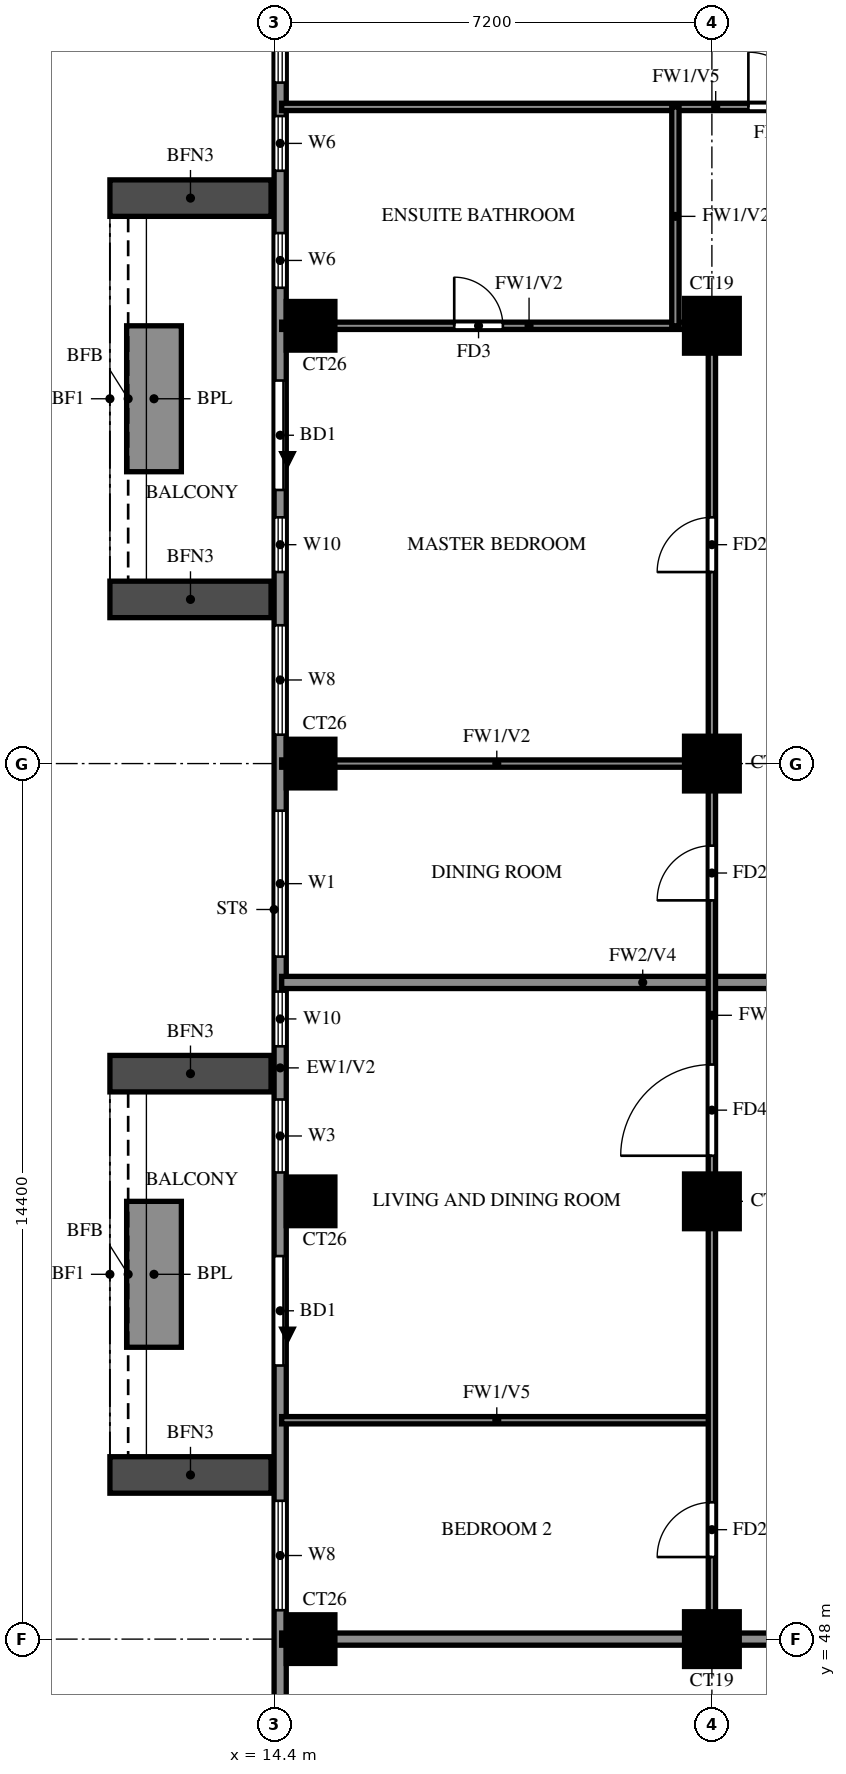
"""IFC4 building model, lengths in metres.
Left out: names, types, materials, properties, quantities, classifications, styles, units other than length and angle.
Written with IfcOpenShell. Run it as: python <this file> out.ifc"""

import sys

from ifc_helpers import new_model, si_unit, direction, frame, frame_2d, origin, origin_2d, place, context, subcontext, project, spatial, rectangle, extrude, source, transform, mapped, element, fill, save


model = new_model("IFC4")
c1 = context("Model", 3, precision=1e-05, world=origin(), true_north=direction((0.0, 1.0)))
c2 = subcontext(c1, "Body", "Model", "MODEL_VIEW")
j1 = project(units=[si_unit("LENGTHUNIT", "METRE"), si_unit("PLANEANGLEUNIT", "RADIAN")], contexts=[c1])
p1 = place(None, origin())
s1 = spatial("IfcSite", under=j1, at=p1, CompositionType="ELEMENT")
p2 = place(p1, origin())
s2 = spatial("IfcBuilding", under=s1, at=p2, CompositionType="ELEMENT")
p3 = place(p2, frame((0.0, 0.0, 178.0)))
s3 = spatial("IfcBuildingStorey", under=s2, at=p3, CompositionType="ELEMENT", Elevation=178.0)
m1 = source(origin(), c2, "Body", "SweptSolid", [
    extrude(rectangle(XDim=0.8, YDim=0.8, at=origin_2d()), origin(), (0.0, 0.0, 1.0), 3.2),
])
p4 = place(p3, frame((15.0, 48.0, 0.0), z_axis=(0.0, 0.0, 1.0), x_axis=(1.0, 0.0, 0.0)))
e1 = element("IfcColumn", 1, at=p4, inside=s3, PredefinedType="COLUMN", context=c2, shape_type="MappedRepresentation", body=[
    mapped(m1, transform((0.0, 0.0, 0.0))),
])
m2 = source(origin(), c2, "Body", "SweptSolid", [
    extrude(rectangle(XDim=0.9, YDim=0.9, at=origin_2d()), origin(), (0.0, 0.0, 1.0), 3.2),
])
p5 = place(p3, frame((21.6, 48.0, 0.0), z_axis=(0.0, 0.0, 1.0), x_axis=(1.0, 0.0, 0.0)))
e2 = element("IfcColumn", 2, at=p5, inside=s3, PredefinedType="COLUMN", context=c2, shape_type="MappedRepresentation", body=[
    mapped(m2, transform((0.0, 0.0, 0.0))),
])
p6 = place(p3, frame((15.0, 55.2, 0.0), z_axis=(0.0, 0.0, 1.0), x_axis=(1.0, 0.0, 0.0)))
e3 = element("IfcColumn", 3, at=p6, inside=s3, PredefinedType="COLUMN", context=c2, shape_type="MappedRepresentation", body=[
    mapped(m1, transform((0.0, 0.0, 0.0))),
])
p7 = place(p3, frame((21.6, 55.2, 0.0), z_axis=(0.0, 0.0, 1.0), x_axis=(1.0, 0.0, 0.0)))
e4 = element("IfcColumn", 4, at=p7, inside=s3, PredefinedType="COLUMN", context=c2, shape_type="MappedRepresentation", body=[
    mapped(m2, transform((0.0, 0.0, 0.0))),
])
p8 = place(p3, frame((15.0, 62.4, 0.0), z_axis=(0.0, 0.0, 1.0), x_axis=(1.0, 0.0, 0.0)))
e5 = element("IfcColumn", 5, at=p8, inside=s3, PredefinedType="COLUMN", context=c2, shape_type="MappedRepresentation", body=[
    mapped(m1, transform((0.0, 0.0, 0.0))),
])
p9 = place(p3, frame((21.6, 62.4, 0.0), z_axis=(0.0, 0.0, 1.0), x_axis=(1.0, 0.0, 0.0)))
e6 = element("IfcColumn", 6, at=p9, inside=s3, PredefinedType="COLUMN", context=c2, shape_type="MappedRepresentation", body=[
    mapped(m2, transform((0.0, 0.0, 0.0))),
])
p10 = place(p3, frame((15.0, 69.6, 0.0), z_axis=(0.0, 0.0, 1.0), x_axis=(1.0, 0.0, 0.0)))
e7 = element("IfcColumn", 7, at=p10, inside=s3, PredefinedType="COLUMN", context=c2, shape_type="MappedRepresentation", body=[
    mapped(m1, transform((0.0, 0.0, 0.0))),
])
p11 = place(p3, frame((21.6, 69.6, 0.0), z_axis=(0.0, 0.0, 1.0), x_axis=(1.0, 0.0, 0.0)))
e8 = element("IfcColumn", 8, at=p11, inside=s3, PredefinedType="COLUMN", context=c2, shape_type="MappedRepresentation", body=[
    mapped(m2, transform((0.0, 0.0, 0.0))),
])
p12 = place(p3, frame((14.5, 76.6, 0.0), z_axis=(0.0, 0.0, 1.0), x_axis=(0.0, -1.0, 0.0)))
e9 = element("IfcWall", 9, at=p12, inside=s3, PredefinedType="SOLIDWALL", context=c2, shape_type="SweptSolid", body=[
    extrude(rectangle(XDim=33.4, YDim=0.2, at=frame_2d((16.7, 0.0))), origin(), (0.0, 0.0, 1.0), 3.2),
])
p13 = place(p12, frame((7.9, 0.0, 0.0)))
e10 = element("IfcOpeningElement", 10, at=p13, cuts=e9, PredefinedType="OPENING", context=c2, shape_type="SweptSolid", body=[
    extrude(rectangle(XDim=1.8, YDim=2.4, at=frame_2d((0.9, 1.2))), frame((0.0, 0.11, 0.0), z_axis=(0.0, -1.0, 0.0), x_axis=(1.0, 0.0, 0.0)), (0.0, 0.0, 1.0), 0.22),
])
p14 = place(p12, frame((22.3, 0.0, 0.0)))
e11 = element("IfcOpeningElement", 11, at=p14, cuts=e9, PredefinedType="OPENING", context=c2, shape_type="SweptSolid", body=[
    extrude(rectangle(XDim=1.8, YDim=2.4, at=frame_2d((0.9, 1.2))), frame((0.0, 0.11, 0.0), z_axis=(0.0, -1.0, 0.0), x_axis=(1.0, 0.0, 0.0)), (0.0, 0.0, 1.0), 0.22),
])
p15 = place(p12, frame((29.875, 0.0, 0.6)))
e12 = element("IfcOpeningElement", 12, at=p15, cuts=e9, PredefinedType="OPENING", context=c2, shape_type="SweptSolid", body=[
    extrude(rectangle(XDim=2.4, YDim=2.4, at=frame_2d((1.2, 1.2))), frame((0.0, 0.11, 0.0), z_axis=(0.0, -1.0, 0.0), x_axis=(1.0, 0.0, 0.0)), (0.0, 0.0, 1.0), 0.22),
])
p16 = place(p12, frame((26.325, 0.0, 0.6)))
e13 = element("IfcOpeningElement", 13, at=p16, cuts=e9, PredefinedType="OPENING", context=c2, shape_type="SweptSolid", body=[
    extrude(rectangle(XDim=1.8, YDim=2.4, at=frame_2d((0.9, 1.2))), frame((0.0, 0.11, 0.0), z_axis=(0.0, -1.0, 0.0), x_axis=(1.0, 0.0, 0.0)), (0.0, 0.0, 1.0), 0.22),
])
p17 = place(p12, frame((17.95, 0.0, 0.6)))
e14 = element("IfcOpeningElement", 14, at=p17, cuts=e9, PredefinedType="OPENING", context=c2, shape_type="SweptSolid", body=[
    extrude(rectangle(XDim=0.9, YDim=2.4, at=frame_2d((0.45, 1.2))), frame((0.0, 0.11, 0.0), z_axis=(0.0, -1.0, 0.0), x_axis=(1.0, 0.0, 0.0)), (0.0, 0.0, 1.0), 0.22),
])
p18 = place(p12, frame((19.725, 0.0, 0.6)))
e15 = element("IfcOpeningElement", 15, at=p18, cuts=e9, PredefinedType="OPENING", context=c2, shape_type="SweptSolid", body=[
    extrude(rectangle(XDim=1.2, YDim=2.4, at=frame_2d((0.6, 1.2))), frame((0.0, 0.11, 0.0), z_axis=(0.0, -1.0, 0.0), x_axis=(1.0, 0.0, 0.0)), (0.0, 0.0, 1.0), 0.22),
])
p19 = place(p12, frame((14.975, 0.0, 0.6)))
e16 = element("IfcOpeningElement", 16, at=p19, cuts=e9, PredefinedType="OPENING", context=c2, shape_type="SweptSolid", body=[
    extrude(rectangle(XDim=2.4, YDim=2.4, at=frame_2d((1.2, 1.2))), frame((0.0, 0.11, 0.0), z_axis=(0.0, -1.0, 0.0), x_axis=(1.0, 0.0, 0.0)), (0.0, 0.0, 1.0), 0.22),
])
p20 = place(p12, frame((10.15, 0.0, 0.6)))
e17 = element("IfcOpeningElement", 17, at=p20, cuts=e9, PredefinedType="OPENING", context=c2, shape_type="SweptSolid", body=[
    extrude(rectangle(XDim=0.9, YDim=2.4, at=frame_2d((0.45, 1.2))), frame((0.0, 0.11, 0.0), z_axis=(0.0, -1.0, 0.0), x_axis=(1.0, 0.0, 0.0)), (0.0, 0.0, 1.0), 0.22),
])
p21 = place(p12, frame((11.925, 0.0, 0.6)))
e18 = element("IfcOpeningElement", 18, at=p21, cuts=e9, PredefinedType="OPENING", context=c2, shape_type="SweptSolid", body=[
    extrude(rectangle(XDim=1.8, YDim=2.4, at=frame_2d((0.9, 1.2))), frame((0.0, 0.11, 0.0), z_axis=(0.0, -1.0, 0.0), x_axis=(1.0, 0.0, 0.0)), (0.0, 0.0, 1.0), 0.22),
])
p22 = place(p12, frame((3.55, 0.0, 1.5)))
e19 = element("IfcOpeningElement", 19, at=p22, cuts=e9, PredefinedType="OPENING", context=c2, shape_type="SweptSolid", body=[
    extrude(rectangle(XDim=0.9, YDim=0.9, at=frame_2d((0.45, 0.45))), frame((0.0, 0.11, 0.0), z_axis=(0.0, -1.0, 0.0), x_axis=(1.0, 0.0, 0.0)), (0.0, 0.0, 1.0), 0.22),
])
p23 = place(p12, frame((5.475, 0.0, 1.5)))
e20 = element("IfcOpeningElement", 20, at=p23, cuts=e9, PredefinedType="OPENING", context=c2, shape_type="SweptSolid", body=[
    extrude(rectangle(XDim=0.9, YDim=0.9, at=frame_2d((0.45, 0.45))), frame((0.0, 0.11, 0.0), z_axis=(0.0, -1.0, 0.0), x_axis=(1.0, 0.0, 0.0)), (0.0, 0.0, 1.0), 0.22),
])
p24 = place(p12, frame((0.6, 0.0, 0.6)))
e21 = element("IfcOpeningElement", 21, at=p24, cuts=e9, PredefinedType="OPENING", context=c2, shape_type="SweptSolid", body=[
    extrude(rectangle(XDim=2.4, YDim=2.4, at=frame_2d((1.2, 1.2))), frame((0.0, 0.11, 0.0), z_axis=(0.0, -1.0, 0.0), x_axis=(1.0, 0.0, 0.0)), (0.0, 0.0, 1.0), 0.22),
])
for number, where, z_axis, x_axis in (
    (22, (14.35, 71.7, 0.0), (0.0, 0.0, 1.0), (-1.0, 0.0, 0.0)),
    (23, (14.35, 65.1, 0.0), (0.0, 0.0, 1.0), (-1.0, 0.0, 0.0)),
):
    element("IfcWall", number, at=place(p3, frame(where, z_axis=z_axis, x_axis=x_axis)), inside=s3, PredefinedType="SOLIDWALL", context=c2, shape_type="SweptSolid", body=[
        extrude(rectangle(XDim=2.65, YDim=0.6, at=frame_2d((1.325, 0.0))), origin(), (0.0, 0.0, 1.0), 2.85),
    ])
p25 = place(p3, frame((12.425, 69.6, 0.0), z_axis=(0.0, 0.0, 1.0), x_axis=(0.0, -1.0, 0.0)))
e24 = element("IfcWall", 24, at=p25, inside=s3, PredefinedType="SOLIDWALL", context=c2, shape_type="SweptSolid", body=[
    extrude(rectangle(XDim=2.4, YDim=0.9, at=frame_2d((1.2, 0.0))), origin(), (0.0, 0.0, 1.0), 0.9),
])
for number, where, z_axis, x_axis in (
    (25, (14.35, 57.3, 0.0), (0.0, 0.0, 1.0), (-1.0, 0.0, 0.0)),
    (26, (14.35, 50.7, 0.0), (0.0, 0.0, 1.0), (-1.0, 0.0, 0.0)),
):
    element("IfcWall", number, at=place(p3, frame(where, z_axis=z_axis, x_axis=x_axis)), inside=s3, PredefinedType="SOLIDWALL", context=c2, shape_type="SweptSolid", body=[
        extrude(rectangle(XDim=2.65, YDim=0.6, at=frame_2d((1.325, 0.0))), origin(), (0.0, 0.0, 1.0), 2.85),
    ])
p26 = place(p3, frame((12.425, 55.2, 0.0), z_axis=(0.0, 0.0, 1.0), x_axis=(0.0, -1.0, 0.0)))
e27 = element("IfcWall", 27, at=p26, inside=s3, PredefinedType="SOLIDWALL", context=c2, shape_type="SweptSolid", body=[
    extrude(rectangle(XDim=2.4, YDim=0.9, at=frame_2d((1.2, 0.0))), origin(), (0.0, 0.0, 1.0), 0.9),
])
p27 = place(p3, frame((14.525, 48.0, 0.0), z_axis=(0.0, 0.0, 1.0), x_axis=(1.0, 0.0, 0.0)))
e28 = element("IfcWall", 28, at=p27, inside=s3, PredefinedType="SOLIDWALL", context=c2, shape_type="SweptSolid", body=[
    extrude(rectangle(XDim=19.075, YDim=0.2, at=frame_2d((9.538, 0.0))), origin(), (0.0, 0.0, 1.0), 3.2),
])
p28 = place(p3, frame((14.525, 58.8, 0.0), z_axis=(0.0, 0.0, 1.0), x_axis=(1.0, 0.0, 0.0)))
e29 = element("IfcWall", 29, at=p28, inside=s3, PredefinedType="SOLIDWALL", context=c2, shape_type="SweptSolid", body=[
    extrude(rectangle(XDim=11.875, YDim=0.2, at=frame_2d((5.938, 0.0))), origin(), (0.0, 0.0, 1.0), 2.3),
])
p29 = place(p3, frame((14.525, 51.6, 0.0), z_axis=(0.0, 0.0, 1.0), x_axis=(1.0, 0.0, 0.0)))
e30 = element("IfcWall", 30, at=p29, inside=s3, PredefinedType="PARTITIONING", context=c2, shape_type="SweptSolid", body=[
    extrude(rectangle(XDim=7.075, YDim=0.12, at=frame_2d((3.538, 0.0))), origin(), (0.0, 0.0, 1.0), 2.3),
])
p30 = place(p3, frame((14.525, 62.4, 0.0), z_axis=(0.0, 0.0, 1.0), x_axis=(1.0, 0.0, 0.0)))
e31 = element("IfcWall", 31, at=p30, inside=s3, PredefinedType="PARTITIONING", context=c2, shape_type="SweptSolid", body=[
    extrude(rectangle(XDim=7.075, YDim=0.12, at=frame_2d((3.538, 0.0))), origin(), (0.0, 0.0, 1.0), 3.2),
])
p31 = place(p3, frame((14.525, 69.6, 0.0), z_axis=(0.0, 0.0, 1.0), x_axis=(1.0, 0.0, 0.0)))
e32 = element("IfcWall", 32, at=p31, inside=s3, PredefinedType="PARTITIONING", context=c2, shape_type="SweptSolid", body=[
    extrude(rectangle(XDim=7.075, YDim=0.12, at=frame_2d((3.538, 0.0))), origin(), (0.0, 0.0, 1.0), 3.2),
])
p32 = place(p31, frame((2.837, 0.0, 0.0)))
e33 = element("IfcOpeningElement", 33, at=p32, cuts=e32, PredefinedType="OPENING", context=c2, shape_type="SweptSolid", body=[
    extrude(rectangle(XDim=0.8, YDim=2.1, at=frame_2d((0.4, 1.05))), frame((0.0, 0.07, 0.0), z_axis=(0.0, -1.0, 0.0), x_axis=(1.0, 0.0, 0.0)), (0.0, 0.0, 1.0), 0.14),
])
p33 = place(p3, frame((14.525, 73.2, 0.0), z_axis=(0.0, 0.0, 1.0), x_axis=(1.0, 0.0, 0.0)))
e34 = element("IfcWall", 34, at=p33, inside=s3, PredefinedType="PARTITIONING", context=c2, shape_type="SweptSolid", body=[
    extrude(rectangle(XDim=14.275, YDim=0.12, at=frame_2d((7.138, 0.0))), origin(), (0.0, 0.0, 1.0), 2.3),
])
p34 = place(p33, frame((7.675, 0.0, 0.0)))
e35 = element("IfcOpeningElement", 35, at=p34, cuts=e34, PredefinedType="OPENING", context=c2, shape_type="SweptSolid", body=[
    extrude(rectangle(XDim=0.9, YDim=2.1, at=frame_2d((0.45, 1.05))), frame((0.0, 0.07, 0.0), z_axis=(0.0, -1.0, 0.0), x_axis=(1.0, 0.0, 0.0)), (0.0, 0.0, 1.0), 0.14),
])
p35 = place(p3, frame((21.0, 69.6, 0.0), z_axis=(0.0, 0.0, 1.0), x_axis=(0.0, 1.0, 0.0)))
e36 = element("IfcWall", 36, at=p35, inside=s3, PredefinedType="PARTITIONING", context=c2, shape_type="SweptSolid", body=[
    extrude(rectangle(XDim=3.6, YDim=0.12, at=frame_2d((1.8, 0.0))), origin(), (0.0, 0.0, 1.0), 3.2),
])
p36 = place(p3, frame((21.6, 48.0, 0.0), z_axis=(0.0, 0.0, 1.0), x_axis=(0.0, 1.0, 0.0)))
e37 = element("IfcWall", 37, at=p36, inside=s3, PredefinedType="PARTITIONING", context=c2, shape_type="SweptSolid", body=[
    extrude(rectangle(XDim=21.6, YDim=0.12, at=frame_2d((10.8, 0.0))), origin(), (0.0, 0.0, 1.0), 3.2),
])
p37 = place(p36, frame((1.35, 0.0, 0.0)))
e38 = element("IfcOpeningElement", 38, at=p37, cuts=e37, PredefinedType="OPENING", context=c2, shape_type="SweptSolid", body=[
    extrude(rectangle(XDim=0.9, YDim=2.1, at=frame_2d((0.45, 1.05))), frame((0.0, 0.07, 0.0), z_axis=(0.0, -1.0, 0.0), x_axis=(1.0, 0.0, 0.0)), (0.0, 0.0, 1.0), 0.14),
])
p38 = place(p36, frame((7.95, 0.0, 0.0)))
e39 = element("IfcOpeningElement", 39, at=p38, cuts=e37, PredefinedType="OPENING", context=c2, shape_type="SweptSolid", body=[
    extrude(rectangle(XDim=1.5, YDim=2.1, at=frame_2d((0.75, 1.05))), frame((0.0, 0.07, 0.0), z_axis=(0.0, -1.0, 0.0), x_axis=(1.0, 0.0, 0.0)), (0.0, 0.0, 1.0), 0.14),
])
p39 = place(p36, frame((12.15, 0.0, 0.0)))
e40 = element("IfcOpeningElement", 40, at=p39, cuts=e37, PredefinedType="OPENING", context=c2, shape_type="SweptSolid", body=[
    extrude(rectangle(XDim=0.9, YDim=2.1, at=frame_2d((0.45, 1.05))), frame((0.0, 0.07, 0.0), z_axis=(0.0, -1.0, 0.0), x_axis=(1.0, 0.0, 0.0)), (0.0, 0.0, 1.0), 0.14),
])
p40 = place(p36, frame((17.55, 0.0, 0.0)))
e41 = element("IfcOpeningElement", 41, at=p40, cuts=e37, PredefinedType="OPENING", context=c2, shape_type="SweptSolid", body=[
    extrude(rectangle(XDim=0.9, YDim=2.1, at=frame_2d((0.45, 1.05))), frame((0.0, 0.07, 0.0), z_axis=(0.0, -1.0, 0.0), x_axis=(1.0, 0.0, 0.0)), (0.0, 0.0, 1.0), 0.14),
])
p41 = place(p13, origin())
e42 = element("IfcDoor", 42, at=p41, inside=s3, OperationType="DOUBLE_DOOR_SLIDING", PredefinedType="DOOR", context=c2, shape_type="SweptSolid", body=[
    extrude(rectangle(XDim=1.8, YDim=2.4, at=frame_2d((0.9, 1.2))), frame((0.0, 0.025, 0.0), z_axis=(0.0, -1.0, 0.0), x_axis=(1.0, 0.0, 0.0)), (0.0, 0.0, 1.0), 0.05),
])
fill(e10, e42)
p42 = place(p14, origin())
e43 = element("IfcDoor", 43, at=p42, inside=s3, OperationType="DOUBLE_DOOR_SLIDING", PredefinedType="DOOR", context=c2, shape_type="SweptSolid", body=[
    extrude(rectangle(XDim=1.8, YDim=2.4, at=frame_2d((0.9, 1.2))), frame((0.0, 0.025, 0.0), z_axis=(0.0, -1.0, 0.0), x_axis=(1.0, 0.0, 0.0)), (0.0, 0.0, 1.0), 0.05),
])
fill(e11, e43)
p43 = place(p16, origin())
e44 = element("IfcWindow", 44, at=p43, inside=s3, PartitioningType="DOUBLE_PANEL_VERTICAL", PredefinedType="WINDOW", context=c2, shape_type="SweptSolid", body=[
    extrude(rectangle(XDim=1.8, YDim=2.4, at=frame_2d((0.9, 1.2))), frame((0.0, 0.03, 0.0), z_axis=(0.0, -1.0, 0.0), x_axis=(1.0, 0.0, 0.0)), (0.0, 0.0, 1.0), 0.06),
])
fill(e13, e44)
p44 = place(p17, origin())
e45 = element("IfcWindow", 45, at=p44, inside=s3, PartitioningType="SINGLE_PANEL", PredefinedType="WINDOW", context=c2, shape_type="SweptSolid", body=[
    extrude(rectangle(XDim=0.9, YDim=2.4, at=frame_2d((0.45, 1.2))), frame((0.0, 0.03, 0.0), z_axis=(0.0, -1.0, 0.0), x_axis=(1.0, 0.0, 0.0)), (0.0, 0.0, 1.0), 0.06),
])
fill(e14, e45)
p45 = place(p18, origin())
e46 = element("IfcWindow", 46, at=p45, inside=s3, PartitioningType="SINGLE_PANEL", PredefinedType="WINDOW", context=c2, shape_type="SweptSolid", body=[
    extrude(rectangle(XDim=1.2, YDim=2.4, at=frame_2d((0.6, 1.2))), frame((0.0, 0.03, 0.0), z_axis=(0.0, -1.0, 0.0), x_axis=(1.0, 0.0, 0.0)), (0.0, 0.0, 1.0), 0.06),
])
fill(e15, e46)
p46 = place(p19, origin())
e47 = element("IfcWindow", 47, at=p46, inside=s3, PartitioningType="DOUBLE_PANEL_VERTICAL", PredefinedType="WINDOW", context=c2, shape_type="SweptSolid", body=[
    extrude(rectangle(XDim=2.4, YDim=2.4, at=frame_2d((1.2, 1.2))), frame((0.0, 0.03, 0.0), z_axis=(0.0, -1.0, 0.0), x_axis=(1.0, 0.0, 0.0)), (0.0, 0.0, 1.0), 0.06),
])
fill(e16, e47)
p47 = place(p20, origin())
e48 = element("IfcWindow", 48, at=p47, inside=s3, PartitioningType="SINGLE_PANEL", PredefinedType="WINDOW", context=c2, shape_type="SweptSolid", body=[
    extrude(rectangle(XDim=0.9, YDim=2.4, at=frame_2d((0.45, 1.2))), frame((0.0, 0.03, 0.0), z_axis=(0.0, -1.0, 0.0), x_axis=(1.0, 0.0, 0.0)), (0.0, 0.0, 1.0), 0.06),
])
fill(e17, e48)
p48 = place(p21, origin())
e49 = element("IfcWindow", 49, at=p48, inside=s3, PartitioningType="DOUBLE_PANEL_VERTICAL", PredefinedType="WINDOW", context=c2, shape_type="SweptSolid", body=[
    extrude(rectangle(XDim=1.8, YDim=2.4, at=frame_2d((0.9, 1.2))), frame((0.0, 0.03, 0.0), z_axis=(0.0, -1.0, 0.0), x_axis=(1.0, 0.0, 0.0)), (0.0, 0.0, 1.0), 0.06),
])
fill(e18, e49)
p49 = place(p22, origin())
e50 = element("IfcWindow", 50, at=p49, inside=s3, PartitioningType="SINGLE_PANEL", PredefinedType="WINDOW", context=c2, shape_type="SweptSolid", body=[
    extrude(rectangle(XDim=0.9, YDim=0.9, at=frame_2d((0.45, 0.45))), frame((0.0, 0.03, 0.0), z_axis=(0.0, -1.0, 0.0), x_axis=(1.0, 0.0, 0.0)), (0.0, 0.0, 1.0), 0.06),
])
fill(e19, e50)
p50 = place(p23, origin())
e51 = element("IfcWindow", 51, at=p50, inside=s3, PartitioningType="SINGLE_PANEL", PredefinedType="WINDOW", context=c2, shape_type="SweptSolid", body=[
    extrude(rectangle(XDim=0.9, YDim=0.9, at=frame_2d((0.45, 0.45))), frame((0.0, 0.03, 0.0), z_axis=(0.0, -1.0, 0.0), x_axis=(1.0, 0.0, 0.0)), (0.0, 0.0, 1.0), 0.06),
])
fill(e20, e51)
p51 = place(p24, origin())
e52 = element("IfcWindow", 52, at=p51, inside=s3, PartitioningType="DOUBLE_PANEL_VERTICAL", PredefinedType="WINDOW", context=c2, shape_type="SweptSolid", body=[
    extrude(rectangle(XDim=2.4, YDim=2.4, at=frame_2d((1.2, 1.2))), frame((0.0, 0.03, 0.0), z_axis=(0.0, -1.0, 0.0), x_axis=(1.0, 0.0, 0.0)), (0.0, 0.0, 1.0), 0.06),
])
fill(e21, e52)
p52 = place(p37, origin())
e53 = element("IfcDoor", 53, at=p52, inside=s3, OperationType="SINGLE_SWING_LEFT", PredefinedType="DOOR", context=c2, shape_type="SweptSolid", body=[
    extrude(rectangle(XDim=0.9, YDim=2.1, at=frame_2d((0.45, 1.05))), frame((0.0, 0.025, 0.0), z_axis=(0.0, -1.0, 0.0), x_axis=(1.0, 0.0, 0.0)), (0.0, 0.0, 1.0), 0.05),
])
fill(e38, e53)
p53 = place(p38, origin())
e54 = element("IfcDoor", 54, at=p53, inside=s3, OperationType="SINGLE_SWING_RIGHT", PredefinedType="DOOR", context=c2, shape_type="SweptSolid", body=[
    extrude(rectangle(XDim=1.5, YDim=2.1, at=frame_2d((0.75, 1.05))), frame((0.0, 0.025, 0.0), z_axis=(0.0, -1.0, 0.0), x_axis=(1.0, 0.0, 0.0)), (0.0, 0.0, 1.0), 0.05),
])
fill(e39, e54)
p54 = place(p39, origin())
e55 = element("IfcDoor", 55, at=p54, inside=s3, OperationType="SINGLE_SWING_LEFT", PredefinedType="DOOR", context=c2, shape_type="SweptSolid", body=[
    extrude(rectangle(XDim=0.9, YDim=2.1, at=frame_2d((0.45, 1.05))), frame((0.0, 0.025, 0.0), z_axis=(0.0, -1.0, 0.0), x_axis=(1.0, 0.0, 0.0)), (0.0, 0.0, 1.0), 0.05),
])
fill(e40, e55)
p55 = place(p40, origin())
e56 = element("IfcDoor", 56, at=p55, inside=s3, OperationType="SINGLE_SWING_RIGHT", PredefinedType="DOOR", context=c2, shape_type="SweptSolid", body=[
    extrude(rectangle(XDim=0.9, YDim=2.1, at=frame_2d((0.45, 1.05))), frame((0.0, 0.025, 0.0), z_axis=(0.0, -1.0, 0.0), x_axis=(1.0, 0.0, 0.0)), (0.0, 0.0, 1.0), 0.05),
])
fill(e41, e56)
p56 = place(p32, origin())
e57 = element("IfcDoor", 57, at=p56, inside=s3, OperationType="SINGLE_SWING_LEFT", PredefinedType="DOOR", context=c2, shape_type="SweptSolid", body=[
    extrude(rectangle(XDim=0.8, YDim=2.1, at=frame_2d((0.4, 1.05))), frame((0.0, 0.025, 0.0), z_axis=(0.0, -1.0, 0.0), x_axis=(1.0, 0.0, 0.0)), (0.0, 0.0, 1.0), 0.05),
])
fill(e33, e57)
p57 = place(p34, origin())
e58 = element("IfcDoor", 58, at=p57, inside=s3, OperationType="SINGLE_SWING_LEFT", PredefinedType="DOOR", context=c2, shape_type="SweptSolid", body=[
    extrude(rectangle(XDim=0.9, YDim=2.1, at=frame_2d((0.45, 1.05))), frame((0.0, 0.025, 0.0), z_axis=(0.0, -1.0, 0.0), x_axis=(1.0, 0.0, 0.0)), (0.0, 0.0, 1.0), 0.05),
])
fill(e35, e58)
save(model, sys.argv[1])
